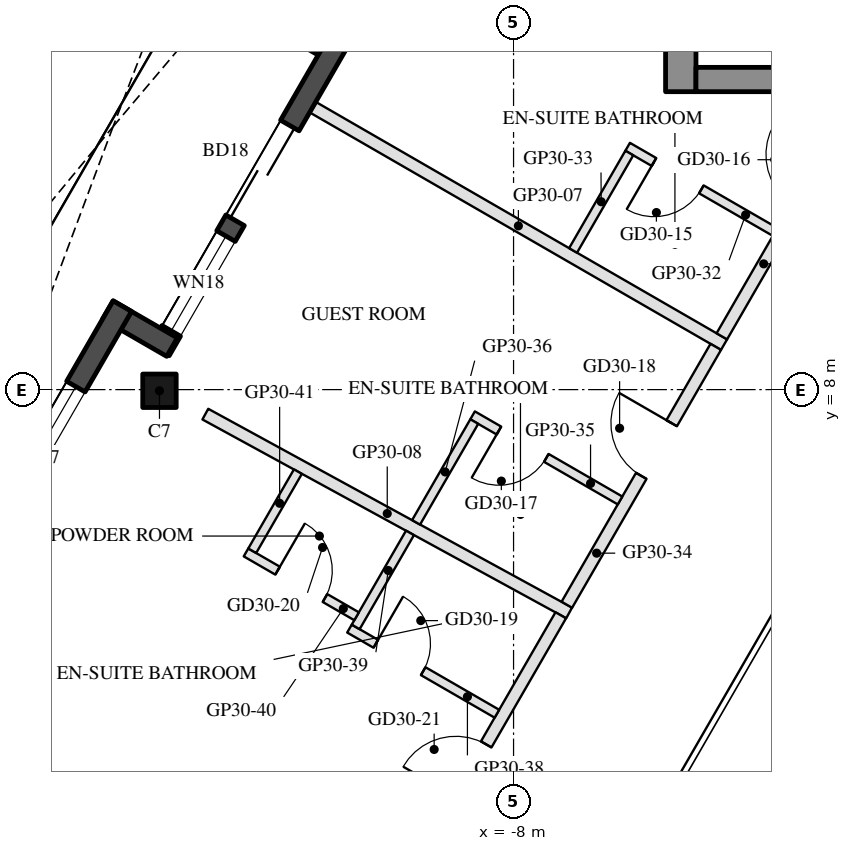
"""IFC4 building model, lengths in metres.
Left out: names, types, materials, properties, quantities, classifications, styles, units other than length and angle.
Written with IfcOpenShell. Run it as: python <this file> out.ifc"""

import sys

from ifc_helpers import new_model, si_unit, direction, frame, frame_2d, origin, origin_2d, place, context, subcontext, project, spatial, rectangle, hollow_rectangle, extrude, boolean, halfspace, element, fill, save


model = new_model("IFC4")
c1 = context("Model", 3, precision=1e-05, world=origin(), true_north=direction((0.0, 1.0)))
c2 = subcontext(c1, "Body", "Model", "MODEL_VIEW")
j1 = project(units=[si_unit("LENGTHUNIT", "METRE"), si_unit("PLANEANGLEUNIT", "RADIAN")], contexts=[c1])
p1 = place(None, origin())
s1 = spatial("IfcSite", under=j1, at=p1, CompositionType="ELEMENT")
p2 = place(p1, origin())
s2 = spatial("IfcBuilding", under=s1, at=p2, CompositionType="ELEMENT")
p3 = place(p2, frame((0.0, 0.0, 298.5)))
s3 = spatial("IfcBuildingStorey", under=s2, at=p3, CompositionType="ELEMENT", Elevation=298.5)
p4 = place(p3, frame((-10.33, 14.032, 0.0), z_axis=(0.100518021011, -0.128316722417, 0.98662604172), x_axis=(0.503129383785, 0.862065632243, 0.060857775822)))
e1 = element("IfcColumn", 1, at=p4, inside=s3, PredefinedType="COLUMN", context=c2, shape_type="SweptSolid", body=[
    boolean("DIFFERENCE", boolean("DIFFERENCE", extrude(hollow_rectangle(XDim=0.55, YDim=0.55, WallThickness=0.025, at=origin_2d()), origin(), (0.0, 0.0, 1.0), 3.75), halfspace(frame((0.0, 0.0, 0.034), z_axis=(0.0, 0.0, 1.0), x_axis=(1.0, 0.0, 0.0)), True)), halfspace(frame((0.0, 0.0, 3.716), z_axis=(0.0, 0.0, 1.0), x_axis=(1.0, 0.0, 0.0)), False)),
])
p5 = place(p3, frame((-13.823, 7.981, 0.0), z_axis=(0.131228839908, -0.075723997581, 0.988455799602), x_axis=(-0.499841813697, -0.866116713392, 7.933019e-06)))
e2 = element("IfcColumn", 2, at=p5, inside=s3, PredefinedType="COLUMN", context=c2, shape_type="SweptSolid", body=[
    boolean("DIFFERENCE", boolean("DIFFERENCE", extrude(hollow_rectangle(XDim=0.55, YDim=0.55, WallThickness=0.025, at=origin_2d()), origin(), (0.0, 0.0, 1.0), 3.743), halfspace(frame((0.0, 0.0, 0.031), z_axis=(0.0, 0.0, 1.0), x_axis=(1.0, 0.0, 0.0)), True)), halfspace(frame((0.0, 0.0, 3.712), z_axis=(0.0, 0.0, 1.0), x_axis=(1.0, 0.0, 0.0)), False)),
])
p6 = place(p3, frame((-11.905, 14.104, 0.0), z_axis=(0.0, 0.0, 1.0), x_axis=(0.866005645448, -0.500034220881, 0.0)))
e3 = element("IfcWall", 3, at=p6, inside=s3, PredefinedType="SOLIDWALL", context=c2, shape_type="SweptSolid", body=[
    extrude(rectangle(XDim=1.22, YDim=0.35, at=frame_2d((0.61, 0.0))), origin(), (0.0, 0.0, 1.0), 3.55),
])
p7 = place(p3, frame((-10.901, 13.692, 0.0), z_axis=(0.0, 0.0, 1.0), x_axis=(-0.499987198161, -0.866032794804, 0.0)))
e4 = element("IfcWall", 4, at=p7, inside=s3, PredefinedType="SOLIDWALL", context=c2, shape_type="SweptSolid", body=[
    extrude(rectangle(XDim=5.827, YDim=0.35, at=frame_2d((2.914, 0.0))), origin(), (0.0, 0.0, 1.0), 3.55),
])
p8 = place(p7, frame((1.557, 0.0, 0.0)))
e5 = element("IfcOpeningElement", 5, at=p8, cuts=e4, PredefinedType="OPENING", context=c2, shape_type="SweptSolid", body=[
    extrude(rectangle(XDim=1.8, YDim=2.4, at=frame_2d((0.9, 1.2))), frame((0.0, 0.185, 0.0), z_axis=(0.0, -1.0, 0.0), x_axis=(1.0, 0.0, 0.0)), (0.0, 0.0, 1.0), 0.37),
])
p9 = place(p7, frame((3.657, 0.0, 0.3)))
e6 = element("IfcOpeningElement", 6, at=p9, cuts=e4, PredefinedType="OPENING", context=c2, shape_type="SweptSolid", body=[
    extrude(rectangle(XDim=1.8, YDim=2.65, at=frame_2d((0.9, 1.325))), frame((0.0, 0.185, 0.0), z_axis=(0.0, -1.0, 0.0), x_axis=(1.0, 0.0, 0.0)), (0.0, 0.0, 1.0), 0.37),
])
p10 = place(p3, frame((-13.616, 8.698, 0.0), z_axis=(0.0, 0.0, 1.0), x_axis=(-0.866005645448, 0.500034220881, 0.0)))
e7 = element("IfcWall", 7, at=p10, inside=s3, PredefinedType="SOLIDWALL", context=c2, shape_type="SweptSolid", body=[
    extrude(rectangle(XDim=1.22, YDim=0.35, at=frame_2d((0.61, 0.0))), origin(), (0.0, 0.0, 1.0), 3.55),
])
p11 = place(p3, frame((-14.434, 9.373, 0.0), z_axis=(0.0, 0.0, 1.0), x_axis=(-0.499999835575, -0.866025498715, 0.0)))
e8 = element("IfcWall", 8, at=p11, inside=s3, PredefinedType="SOLIDWALL", context=c2, shape_type="SweptSolid", body=[
    extrude(rectangle(XDim=8.787, YDim=0.35, at=frame_2d((4.394, 0.0))), origin(), (0.0, 0.0, 1.0), 3.55),
])
p12 = place(p11, frame((1.528, 0.0, 0.3)))
e9 = element("IfcOpeningElement", 9, at=p12, cuts=e8, PredefinedType="OPENING", context=c2, shape_type="SweptSolid", body=[
    extrude(rectangle(XDim=2.7, YDim=2.65, at=frame_2d((1.35, 1.325))), frame((0.0, 0.185, 0.0), z_axis=(0.0, -1.0, 0.0), x_axis=(1.0, 0.0, 0.0)), (0.0, 0.0, 1.0), 0.37),
])
p13 = place(p11, frame((5.013, 0.0, 0.3)))
e10 = element("IfcOpeningElement", 10, at=p13, cuts=e8, PredefinedType="OPENING", context=c2, shape_type="SweptSolid", body=[
    extrude(rectangle(XDim=2.0, YDim=2.65, at=frame_2d((1.0, 1.325))), frame((0.0, 0.185, 0.0), z_axis=(0.0, -1.0, 0.0), x_axis=(1.0, 0.0, 0.0)), (0.0, 0.0, 1.0), 0.37),
])
p14 = place(p3, frame((-5.25, 12.9, 0.0), z_axis=(0.0, 0.0, 1.0), x_axis=(0.0, 1.0, 0.0)))
e11 = element("IfcWall", 11, at=p14, inside=s3, PredefinedType="SHEAR", context=c2, shape_type="SweptSolid", body=[
    extrude(rectangle(XDim=11.222, YDim=0.5, at=frame_2d((5.611, 0.0))), origin(), (0.0, 0.0, 1.0), 3.5),
])
p15 = place(p3, frame((5.0, 13.1, 0.0), z_axis=(0.0, 0.0, 1.0), x_axis=(-1.0, 0.0, 0.0)))
e12 = element("IfcWall", 12, at=p15, inside=s3, PredefinedType="SHEAR", context=c2, shape_type="SweptSolid", body=[
    extrude(rectangle(XDim=10.0, YDim=0.4, at=frame_2d((5.0, 0.0))), origin(), (0.0, 0.0, 1.0), 3.5),
])
p16 = place(p15, frame((3.55, 0.0, 0.0)))
e13 = element("IfcOpeningElement", 13, at=p16, cuts=e12, PredefinedType="OPENING", context=c2, shape_type="SweptSolid", body=[
    extrude(rectangle(XDim=1.1, YDim=2.1, at=frame_2d((0.55, 1.05))), frame((0.0, 0.21, 0.0), z_axis=(0.0, -1.0, 0.0), x_axis=(1.0, 0.0, 0.0)), (0.0, 0.0, 1.0), 0.42),
])
p17 = place(p15, frame((5.85, 0.0, 0.0)))
e14 = element("IfcOpeningElement", 14, at=p17, cuts=e12, PredefinedType="OPENING", context=c2, shape_type="SweptSolid", body=[
    extrude(rectangle(XDim=1.4, YDim=2.1, at=frame_2d((0.7, 1.05))), frame((0.0, 0.21, 0.0), z_axis=(0.0, -1.0, 0.0), x_axis=(1.0, 0.0, 0.0)), (0.0, 0.0, 1.0), 0.42),
])
p18 = place(p3, frame((-11.303, 12.646, 0.0), z_axis=(0.0, 0.0, 1.0), x_axis=(0.866022678253, -0.500004720729, 0.0)))
e15 = element("IfcWall", 15, at=p18, inside=s3, PredefinedType="PARTITIONING", context=c2, shape_type="SweptSolid", body=[
    extrude(rectangle(XDim=7.812, YDim=0.2, at=frame_2d((3.906, 0.0))), origin(), (0.0, 0.0, 1.0), 3.1),
])
p19 = place(p3, frame((-13.069, 7.597, 0.0), z_axis=(0.0, 0.0, 1.0), x_axis=(0.877540903987, -0.479501785012, 0.0)))
e16 = element("IfcWall", 16, at=p19, inside=s3, PredefinedType="PARTITIONING", context=c2, shape_type="SweptSolid", body=[
    extrude(rectangle(XDim=6.818, YDim=0.2, at=frame_2d((3.409, 0.0))), origin(), (0.0, 0.0, 1.0), 3.1),
])
p20 = place(p3, frame((-4.575, 8.876, 0.0), z_axis=(0.0, 0.0, 1.0), x_axis=(0.50000187635, 0.866024320471, 0.0)))
e17 = element("IfcWall", 17, at=p20, inside=s3, PredefinedType="PARTITIONING", context=c2, shape_type="SweptSolid", body=[
    extrude(rectangle(XDim=4.588, YDim=0.2, at=frame_2d((2.294, 0.0))), origin(), (0.0, 0.0, 1.0), 3.1),
])
p21 = place(p20, frame((2.45, 0.0, 0.0)))
e18 = element("IfcOpeningElement", 18, at=p21, cuts=e17, PredefinedType="OPENING", context=c2, shape_type="SweptSolid", body=[
    extrude(rectangle(XDim=1.0, YDim=2.1, at=frame_2d((0.5, 1.05))), frame((0.0, 0.11, 0.0), z_axis=(0.0, -1.0, 0.0), x_axis=(1.0, 0.0, 0.0)), (0.0, 0.0, 1.0), 0.22),
])
p22 = place(p3, frame((-3.699, 10.594, 0.0), z_axis=(0.0, 0.0, 1.0), x_axis=(-0.865996816683, 0.500049511043, 0.0)))
e19 = element("IfcWall", 19, at=p22, inside=s3, PredefinedType="PARTITIONING", context=c2, shape_type="SweptSolid", body=[
    extrude(rectangle(XDim=2.8, YDim=0.15, at=frame_2d((1.4, 0.0))), origin(), (0.0, 0.0, 1.0), 3.55),
])
p23 = place(p22, frame((1.4, 0.0, 0.0)))
e20 = element("IfcOpeningElement", 20, at=p23, cuts=e19, PredefinedType="OPENING", context=c2, shape_type="SweptSolid", body=[
    extrude(rectangle(XDim=0.9, YDim=2.1, at=frame_2d((0.45, 1.05))), frame((0.0, 0.085, 0.0), z_axis=(0.0, -1.0, 0.0), x_axis=(1.0, 0.0, 0.0)), (0.0, 0.0, 1.0), 0.17),
])
p24 = place(p3, frame((-6.096, 11.891, 0.0), z_axis=(0.0, 0.0, 1.0), x_axis=(-0.49994333299, -0.866058118026, 0.0)))
e21 = element("IfcWall", 21, at=p24, inside=s3, PredefinedType="PARTITIONING", context=c2, shape_type="SweptSolid", body=[
    extrude(rectangle(XDim=1.85, YDim=0.15, at=frame_2d((0.925, 0.0))), origin(), (0.0, 0.0, 1.0), 3.1),
])
p25 = place(p3, frame((-7.123, 4.462, 0.0), z_axis=(0.0, 0.0, 1.0), x_axis=(0.499988551067, 0.866032013728, 0.0)))
e22 = element("IfcWall", 22, at=p25, inside=s3, PredefinedType="PARTITIONING", context=c2, shape_type="SweptSolid", body=[
    extrude(rectangle(XDim=4.897, YDim=0.2, at=frame_2d((2.449, 0.0))), origin(), (0.0, 0.0, 1.0), 3.1),
])
p26 = place(p25, frame((2.448, 0.0, 0.0)))
e23 = element("IfcOpeningElement", 23, at=p26, cuts=e22, PredefinedType="OPENING", context=c2, shape_type="SweptSolid", body=[
    extrude(rectangle(XDim=1.0, YDim=2.1, at=frame_2d((0.5, 1.05))), frame((0.0, 0.11, 0.0), z_axis=(0.0, -1.0, 0.0), x_axis=(1.0, 0.0, 0.0)), (0.0, 0.0, 1.0), 0.22),
])
p27 = place(p3, frame((-6.249, 6.177, 0.0), z_axis=(0.0, 0.0, 1.0), x_axis=(-0.866034573852, 0.49998411664, 0.0)))
e24 = element("IfcWall", 24, at=p27, inside=s3, PredefinedType="PARTITIONING", context=c2, shape_type="SweptSolid", body=[
    extrude(rectangle(XDim=2.8, YDim=0.15, at=frame_2d((1.4, 0.0))), origin(), (0.0, 0.0, 1.0), 3.55),
])
p28 = place(p27, frame((1.4, 0.0, 0.0)))
e25 = element("IfcOpeningElement", 25, at=p28, cuts=e24, PredefinedType="OPENING", context=c2, shape_type="SweptSolid", body=[
    extrude(rectangle(XDim=0.9, YDim=2.1, at=frame_2d((0.45, 1.05))), frame((0.0, 0.085, 0.0), z_axis=(0.0, -1.0, 0.0), x_axis=(1.0, 0.0, 0.0)), (0.0, 0.0, 1.0), 0.17),
])
p29 = place(p3, frame((-8.646, 7.475, 0.0), z_axis=(0.0, 0.0, 1.0), x_axis=(-0.499980071345, -0.866036909293, 0.0)))
e26 = element("IfcWall", 26, at=p29, inside=s3, PredefinedType="PARTITIONING", context=c2, shape_type="SweptSolid", body=[
    extrude(rectangle(XDim=1.914, YDim=0.15, at=frame_2d((0.957, 0.0))), origin(), (0.0, 0.0, 1.0), 3.55),
])
p30 = place(p3, frame((-12.269, -4.45, 0.0), z_axis=(0.0, 0.0, 1.0), x_axis=(0.500016364551, 0.8660159555, 0.0)))
e27 = element("IfcWall", 27, at=p30, inside=s3, PredefinedType="PARTITIONING", context=c2, shape_type="SweptSolid", body=[
    extrude(rectangle(XDim=10.091, YDim=0.2, at=frame_2d((5.045, 0.0))), origin(), (0.0, 0.0, 1.0), 3.1),
])
p31 = place(p30, frame((6.638, 0.0, 0.0)))
e28 = element("IfcOpeningElement", 28, at=p31, cuts=e27, PredefinedType="OPENING", context=c2, shape_type="SweptSolid", body=[
    extrude(rectangle(XDim=1.0, YDim=2.1, at=frame_2d((0.5, 1.05))), frame((0.0, 0.11, 0.0), z_axis=(0.0, -1.0, 0.0), x_axis=(1.0, 0.0, 0.0)), (0.0, 0.0, 1.0), 0.22),
])
p32 = place(p3, frame((-10.698, 4.07, 0.0), z_axis=(0.0, 0.0, 1.0), x_axis=(0.865996816683, -0.500049511043, 0.0)))
e29 = element("IfcWall", 29, at=p32, inside=s3, PredefinedType="PARTITIONING", context=c2, shape_type="SweptSolid", body=[
    extrude(rectangle(XDim=2.8, YDim=0.15, at=frame_2d((1.4, 0.0))), origin(), (0.0, 0.0, 1.0), 3.55),
])
p33 = place(p32, frame((0.5, 0.0, 0.0)))
e30 = element("IfcOpeningElement", 30, at=p33, cuts=e29, PredefinedType="OPENING", context=c2, shape_type="SweptSolid", body=[
    extrude(rectangle(XDim=0.9, YDim=2.1, at=frame_2d((0.45, 1.05))), frame((0.0, 0.085, 0.0), z_axis=(0.0, -1.0, 0.0), x_axis=(1.0, 0.0, 0.0)), (0.0, 0.0, 1.0), 0.17),
])
p34 = place(p3, frame((-9.703, 5.644, 0.0), z_axis=(0.0, 0.0, 1.0), x_axis=(-0.500049831026, -0.865996631917, 0.0)))
e31 = element("IfcWall", 31, at=p34, inside=s3, PredefinedType="PARTITIONING", context=c2, shape_type="SweptSolid", body=[
    extrude(rectangle(XDim=1.786, YDim=0.15, at=frame_2d((0.893, 0.0))), origin(), (0.0, 0.0, 1.0), 3.1),
])
p35 = place(p3, frame((-12.4, 5.322, 0.0), z_axis=(0.0, 0.0, 1.0), x_axis=(0.866009402589, -0.500027713859, 0.0)))
e32 = element("IfcWall", 32, at=p35, inside=s3, PredefinedType="PARTITIONING", context=c2, shape_type="SweptSolid", body=[
    extrude(rectangle(XDim=2.1, YDim=0.15, at=frame_2d((1.05, 0.0))), origin(), (0.0, 0.0, 1.0), 3.55),
])
p36 = place(p35, frame((0.6, 0.0, 0.0)))
e33 = element("IfcOpeningElement", 33, at=p36, cuts=e32, PredefinedType="OPENING", context=c2, shape_type="SweptSolid", body=[
    extrude(rectangle(XDim=0.9, YDim=2.1, at=frame_2d((0.45, 1.05))), frame((0.0, 0.085, 0.0), z_axis=(0.0, -1.0, 0.0), x_axis=(1.0, 0.0, 0.0)), (0.0, 0.0, 1.0), 0.17),
])
p37 = place(p3, frame((-11.546, 6.651, 0.0), z_axis=(0.0, 0.0, 1.0), x_axis=(-0.500036614457, -0.866004263386, 0.0)))
e34 = element("IfcWall", 34, at=p37, inside=s3, PredefinedType="PARTITIONING", context=c2, shape_type="SweptSolid", body=[
    extrude(rectangle(XDim=1.502, YDim=0.15, at=frame_2d((0.751, 0.0))), origin(), (0.0, 0.0, 1.0), 3.1),
])
p38 = place(p8, frame((1.8, 0.0, 0.0), z_axis=(0.0, 0.0, 1.0), x_axis=(-1.0, 0.0, 0.0)))
e35 = element("IfcDoor", 35, at=p38, inside=s3, OperationType="SLIDING_TO_LEFT", PredefinedType="DOOR", context=c2, shape_type="SweptSolid", body=[
    extrude(rectangle(XDim=1.8, YDim=2.4, at=frame_2d((0.9, 1.2))), frame((0.0, 0.025, 0.0), z_axis=(0.0, -1.0, 0.0), x_axis=(1.0, 0.0, 0.0)), (0.0, 0.0, 1.0), 0.05),
])
fill(e5, e35)
p39 = place(p9, origin())
e36 = element("IfcWindow", 36, at=p39, inside=s3, PartitioningType="SINGLE_PANEL", PredefinedType="WINDOW", context=c2, shape_type="SweptSolid", body=[
    extrude(rectangle(XDim=1.8, YDim=2.65, at=frame_2d((0.9, 1.325))), frame((0.0, 0.03, 0.0), z_axis=(0.0, -1.0, 0.0), x_axis=(1.0, 0.0, 0.0)), (0.0, 0.0, 1.0), 0.06),
])
fill(e6, e36)
p40 = place(p12, origin())
e37 = element("IfcWindow", 37, at=p40, inside=s3, PartitioningType="SINGLE_PANEL", PredefinedType="WINDOW", context=c2, shape_type="SweptSolid", body=[
    extrude(rectangle(XDim=2.7, YDim=2.65, at=frame_2d((1.35, 1.325))), frame((0.0, 0.03, 0.0), z_axis=(0.0, -1.0, 0.0), x_axis=(1.0, 0.0, 0.0)), (0.0, 0.0, 1.0), 0.06),
])
fill(e9, e37)
p41 = place(p23, origin())
e38 = element("IfcDoor", 38, at=p41, inside=s3, OperationType="SINGLE_SWING_RIGHT", PredefinedType="DOOR", context=c2, shape_type="SweptSolid", body=[
    extrude(rectangle(XDim=0.9, YDim=2.1, at=frame_2d((0.45, 1.05))), frame((0.0, 0.025, 0.0), z_axis=(0.0, -1.0, 0.0), x_axis=(1.0, 0.0, 0.0)), (0.0, 0.0, 1.0), 0.05),
])
fill(e20, e38)
p42 = place(p28, origin())
e39 = element("IfcDoor", 39, at=p42, inside=s3, OperationType="SINGLE_SWING_RIGHT", PredefinedType="DOOR", context=c2, shape_type="SweptSolid", body=[
    extrude(rectangle(XDim=0.9, YDim=2.1, at=frame_2d((0.45, 1.05))), frame((0.0, 0.025, 0.0), z_axis=(0.0, -1.0, 0.0), x_axis=(1.0, 0.0, 0.0)), (0.0, 0.0, 1.0), 0.05),
])
fill(e25, e39)
p43 = place(p26, origin())
e40 = element("IfcDoor", 40, at=p43, inside=s3, OperationType="SINGLE_SWING_RIGHT", PredefinedType="DOOR", context=c2, shape_type="SweptSolid", body=[
    extrude(rectangle(XDim=1.0, YDim=2.1, at=frame_2d((0.5, 1.05))), frame((0.0, 0.025, 0.0), z_axis=(0.0, -1.0, 0.0), x_axis=(1.0, 0.0, 0.0)), (0.0, 0.0, 1.0), 0.05),
])
fill(e23, e40)
p44 = place(p33, origin())
e41 = element("IfcDoor", 41, at=p44, inside=s3, OperationType="SINGLE_SWING_LEFT", PredefinedType="DOOR", context=c2, shape_type="SweptSolid", body=[
    extrude(rectangle(XDim=0.9, YDim=2.1, at=frame_2d((0.45, 1.05))), frame((0.0, 0.025, 0.0), z_axis=(0.0, -1.0, 0.0), x_axis=(1.0, 0.0, 0.0)), (0.0, 0.0, 1.0), 0.05),
])
fill(e30, e41)
p45 = place(p36, origin())
e42 = element("IfcDoor", 42, at=p45, inside=s3, OperationType="SINGLE_SWING_LEFT", PredefinedType="DOOR", context=c2, shape_type="SweptSolid", body=[
    extrude(rectangle(XDim=0.9, YDim=2.1, at=frame_2d((0.45, 1.05))), frame((0.0, 0.025, 0.0), z_axis=(0.0, -1.0, 0.0), x_axis=(1.0, 0.0, 0.0)), (0.0, 0.0, 1.0), 0.05),
])
fill(e33, e42)
p46 = place(p31, origin())
e43 = element("IfcDoor", 43, at=p46, inside=s3, OperationType="SINGLE_SWING_LEFT", PredefinedType="DOOR", context=c2, shape_type="SweptSolid", body=[
    extrude(rectangle(XDim=1.0, YDim=2.1, at=frame_2d((0.5, 1.05))), frame((0.0, 0.025, 0.0), z_axis=(0.0, -1.0, 0.0), x_axis=(1.0, 0.0, 0.0)), (0.0, 0.0, 1.0), 0.05),
])
fill(e28, e43)
save(model, sys.argv[1])
